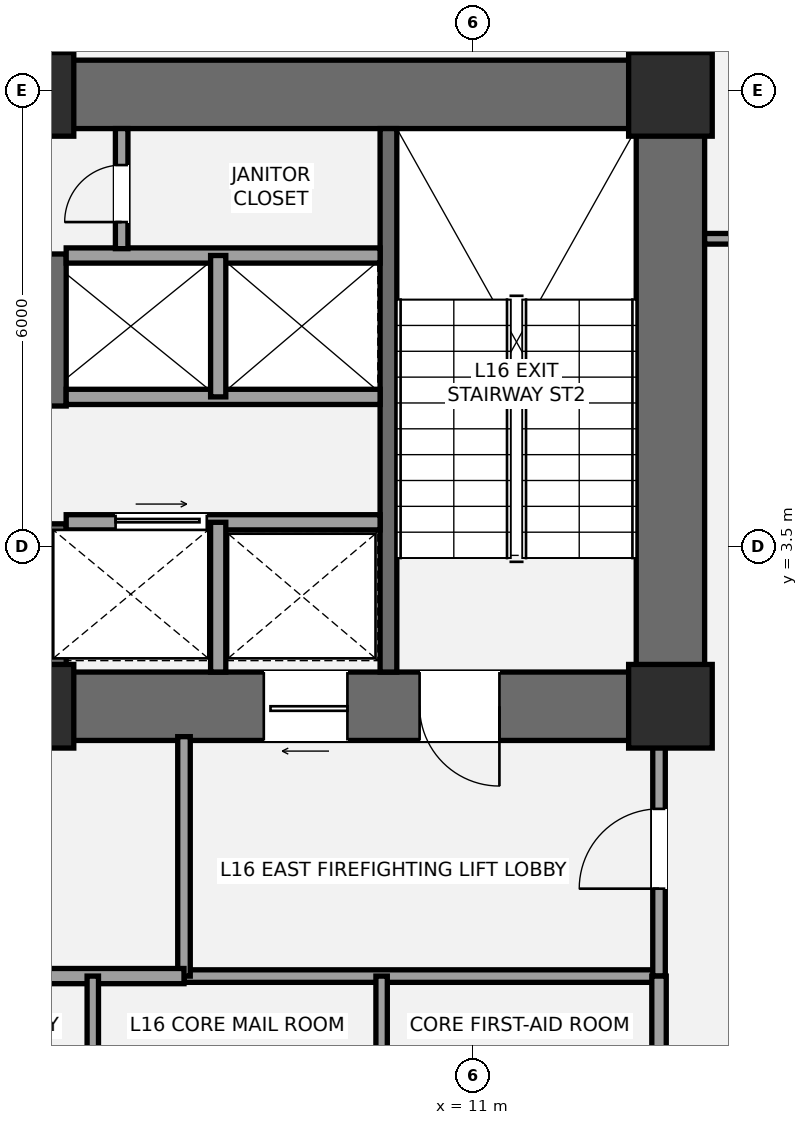
"""IFC4 building model, lengths in metres.
Left out: names, types, materials, properties, quantities, classifications, styles, units other than length and angle.
Written with IfcOpenShell. Run it as: python <this file> out.ifc"""

import sys

from ifc_helpers import new_model, si_unit, direction, frame, frame_2d, origin, origin_2d, place, context, subcontext, project, spatial, rectangle, extrude, element, fill, save


model = new_model("IFC4")
c1 = context("Model", 3, precision=1e-05, world=origin(), true_north=direction((0.0, 1.0)))
c2 = subcontext(c1, "Body", "Model", "MODEL_VIEW")
j1 = project(units=[si_unit("LENGTHUNIT", "METRE"), si_unit("PLANEANGLEUNIT", "RADIAN")], contexts=[c1])
p1 = place(None, origin())
s1 = spatial("IfcSite", under=j1, at=p1, CompositionType="ELEMENT")
p2 = place(p1, origin())
s2 = spatial("IfcBuilding", under=s1, at=p2, CompositionType="ELEMENT")
p3 = place(p2, frame((0.0, 0.0, 63.0)))
s3 = spatial("IfcBuildingStorey", under=s2, at=p3, CompositionType="ELEMENT", Elevation=63.0)
p4 = place(p3, frame((13.6, 0.95, 0.0), z_axis=(0.0, 0.0, 1.0), x_axis=(0.0, 1.0, 0.0)))
e1 = element("IfcWall", 1, at=p4, inside=s3, PredefinedType="SHEAR", context=c2, shape_type="SweptSolid", body=[
    extrude(rectangle(XDim=8.95, YDim=0.9, at=frame_2d((4.475, 0.0))), origin(), (0.0, 0.0, 1.0), 3.6),
])
p5 = place(p3, frame((4.35, 9.45, 0.0), z_axis=(0.0, 0.0, 1.0), x_axis=(1.0, 0.0, 0.0)))
e2 = element("IfcWall", 2, at=p5, inside=s3, PredefinedType="SHEAR", context=c2, shape_type="SweptSolid", body=[
    extrude(rectangle(XDim=9.7, YDim=0.9, at=frame_2d((4.85, 0.0))), origin(), (0.0, 0.0, 1.0), 3.6),
])
p6 = place(p3, frame((14.05, 1.4, 0.0), z_axis=(0.0, 0.0, 1.0), x_axis=(-1.0, 0.0, 0.0)))
e3 = element("IfcWall", 3, at=p6, inside=s3, PredefinedType="SHEAR", context=c2, shape_type="SweptSolid", body=[
    extrude(rectangle(XDim=9.3, YDim=0.9, at=frame_2d((4.65, 0.0))), origin(), (0.0, 0.0, 1.0), 3.6),
])
p7 = place(p6, frame((2.7, 0.0, 0.0)))
e4 = element("IfcOpeningElement", 4, at=p7, cuts=e3, PredefinedType="OPENING", context=c2, shape_type="SweptSolid", body=[
    extrude(rectangle(XDim=1.05, YDim=2.15, at=frame_2d((0.525, 1.075))), frame((0.0, 0.46, 0.0), z_axis=(0.0, -1.0, 0.0), x_axis=(1.0, 0.0, 0.0)), (0.0, 0.0, 1.0), 0.92),
])
p8 = place(p6, frame((4.7, 0.0, 0.0)))
e5 = element("IfcOpeningElement", 5, at=p8, cuts=e3, PredefinedType="OPENING", context=c2, shape_type="SweptSolid", body=[
    extrude(rectangle(XDim=1.1, YDim=2.2, at=frame_2d((0.55, 1.1))), frame((0.0, 0.46, 0.0), z_axis=(0.0, -1.0, 0.0), x_axis=(1.0, 0.0, 0.0)), (0.0, 0.0, 1.0), 0.92),
])
p9 = place(p3, frame((5.2, 0.95, 0.0), z_axis=(0.0, 0.0, 1.0), x_axis=(0.0, 1.0, 0.0)))
e6 = element("IfcWall", 6, at=p9, inside=s3, PredefinedType="SHEAR", context=c2, shape_type="SweptSolid", body=[
    extrude(rectangle(XDim=2.85, YDim=0.9, at=frame_2d((1.425, 0.0))), origin(), (0.0, 0.0, 1.0), 3.6),
])
p10 = place(p3, frame((5.2, 5.35, 0.0), z_axis=(0.0, 0.0, 1.0), x_axis=(0.0, 1.0, 0.0)))
e7 = element("IfcWall", 7, at=p10, inside=s3, PredefinedType="SHEAR", context=c2, shape_type="SweptSolid", body=[
    extrude(rectangle(XDim=2.0, YDim=0.9, at=frame_2d((1.0, 0.0))), origin(), (0.0, 0.0, 1.0), 3.6),
])
p11 = place(p3, frame((9.89, 1.85, 0.0), z_axis=(0.0, 0.0, 1.0), x_axis=(0.0, 1.0, 0.0)))
e8 = element("IfcWall", 8, at=p11, inside=s3, PredefinedType="SHEAR", context=c2, shape_type="SweptSolid", body=[
    extrude(rectangle(XDim=7.15, YDim=0.22, at=frame_2d((3.575, 0.0))), origin(), (0.0, 0.0, 1.0), 3.6),
])
for number, where, z_axis, x_axis in (
    (9, (5.2, 1.4, 0.0), (0.0, 0.0, 1.0), (1.0, 0.0, 0.0)),
    (10, (5.2, 9.45, 0.0), (0.0, 0.0, 1.0), (1.0, 0.0, 0.0)),
    (11, (13.6, 1.4, 0.0), (0.0, 0.0, 1.0), (1.0, 0.0, 0.0)),
    (12, (13.6, 9.45, 0.0), (0.0, 0.0, 1.0), (1.0, 0.0, 0.0)),
):
    element("IfcColumn", number, at=place(p3, frame(where, z_axis=z_axis, x_axis=x_axis)), inside=s3, PredefinedType="COLUMN", context=c2, shape_type="SweptSolid", body=[
        extrude(rectangle(XDim=1.1, YDim=1.1, at=origin_2d()), origin(), (0.0, 0.0, 1.0), 3.6),
    ])
p12 = place(p3, frame((7.2, -2.15, 0.0), z_axis=(0.0, 0.0, 1.0), x_axis=(1.0, 0.0, 0.0)))
e13 = element("IfcWall", 13, at=p12, inside=s3, PredefinedType="PARTITIONING", context=c2, shape_type="SweptSolid", body=[
    extrude(rectangle(XDim=6.25, YDim=0.165, at=frame_2d((3.125, 0.0))), origin(), (0.0, 0.0, 1.0), 3.4),
])
p13 = place(p3, frame((7.2, -2.15, 0.0), z_axis=(0.0, 0.0, 1.0), x_axis=(0.0, 1.0, 0.0)))
e14 = element("IfcWall", 14, at=p13, inside=s3, PredefinedType="PARTITIONING", context=c2, shape_type="SweptSolid", body=[
    extrude(rectangle(XDim=3.15, YDim=0.165, at=frame_2d((1.575, 0.0))), origin(), (0.0, 0.0, 1.0), 2.853),
])
p14 = place(p3, frame((13.45, -2.15, 0.0), z_axis=(0.0, 0.0, 1.0), x_axis=(0.0, 1.0, 0.0)))
e15 = element("IfcWall", 15, at=p14, inside=s3, PredefinedType="PARTITIONING", context=c2, shape_type="SweptSolid", body=[
    extrude(rectangle(XDim=3.15, YDim=0.165, at=frame_2d((1.575, 0.0))), origin(), (0.0, 0.0, 1.0), 2.853),
])
p15 = place(p14, frame((1.15, 0.0, 0.0)))
e16 = element("IfcOpeningElement", 16, at=p15, cuts=e15, PredefinedType="OPENING", context=c2, shape_type="SweptSolid", body=[
    extrude(rectangle(XDim=1.05, YDim=2.15, at=frame_2d((0.525, 1.075))), frame((0.0, 0.093, 0.0), z_axis=(0.0, -1.0, 0.0), x_axis=(1.0, 0.0, 0.0)), (0.0, 0.0, 1.0), 0.185),
])
p16 = place(p3, frame((4.95, -2.15, 0.0), z_axis=(0.0, 0.0, 1.0), x_axis=(1.0, 0.0, 0.0)))
e17 = element("IfcWall", 17, at=p16, inside=s3, PredefinedType="SOLIDWALL", context=c2, shape_type="SweptSolid", body=[
    extrude(rectangle(XDim=2.25, YDim=0.2, at=frame_2d((1.125, 0.0))), origin(), (0.0, 0.0, 1.0), 3.4),
])
p17 = place(p3, frame((5.65, 3.82, 0.0), z_axis=(0.0, 0.0, 1.0), x_axis=(1.0, 0.0, 0.0)))
e18 = element("IfcWall", 18, at=p17, inside=s3, PredefinedType="SOLIDWALL", context=c2, shape_type="SweptSolid", body=[
    extrude(rectangle(XDim=4.13, YDim=0.2, at=frame_2d((2.065, 0.0))), origin(), (0.0, 0.0, 1.0), 3.4),
])
p18 = place(p17, frame((0.65, 0.0, 0.0)))
e19 = element("IfcOpeningElement", 19, at=p18, cuts=e18, PredefinedType="OPENING", context=c2, shape_type="SweptSolid", body=[
    extrude(rectangle(XDim=1.2, YDim=2.2, at=frame_2d((0.6, 1.1))), frame((0.0, 0.11, 0.0), z_axis=(0.0, -1.0, 0.0), x_axis=(1.0, 0.0, 0.0)), (0.0, 0.0, 1.0), 0.22),
])
p19 = place(p3, frame((7.65, 1.85, 0.0), z_axis=(0.0, 0.0, 1.0), x_axis=(0.0, 1.0, 0.0)))
e20 = element("IfcWall", 20, at=p19, inside=s3, PredefinedType="SOLIDWALL", context=c2, shape_type="SweptSolid", body=[
    extrude(rectangle(XDim=1.97, YDim=0.2, at=frame_2d((0.985, 0.0))), origin(), (0.0, 0.0, 1.0), 3.4),
])
for number, where, z_axis, x_axis in (
    (21, (5.65, 5.47, 0.0), (0.0, 0.0, 1.0), (1.0, 0.0, 0.0)),
    (22, (5.65, 7.33, 0.0), (0.0, 0.0, 1.0), (1.0, 0.0, 0.0)),
):
    element("IfcWall", number, at=place(p3, frame(where, z_axis=z_axis, x_axis=x_axis)), inside=s3, PredefinedType="SOLIDWALL", context=c2, shape_type="SweptSolid", body=[
        extrude(rectangle(XDim=4.13, YDim=0.2, at=frame_2d((2.065, 0.0))), origin(), (0.0, 0.0, 1.0), 3.4),
    ])
p20 = place(p3, frame((7.65, 5.47, 0.0), z_axis=(0.0, 0.0, 1.0), x_axis=(0.0, 1.0, 0.0)))
e23 = element("IfcWall", 23, at=p20, inside=s3, PredefinedType="SOLIDWALL", context=c2, shape_type="SweptSolid", body=[
    extrude(rectangle(XDim=1.86, YDim=0.2, at=frame_2d((0.93, 0.0))), origin(), (0.0, 0.0, 1.0), 3.4),
])
p21 = place(p3, frame((6.38, 7.42, 0.0), z_axis=(0.0, 0.0, 1.0), x_axis=(0.0, 1.0, 0.0)))
e24 = element("IfcWall", 24, at=p21, inside=s3, PredefinedType="PARTITIONING", context=c2, shape_type="SweptSolid", body=[
    extrude(rectangle(XDim=1.58, YDim=0.165, at=frame_2d((0.79, 0.0))), origin(), (0.0, 0.0, 1.0), 3.4),
])
p22 = place(p21, frame((0.35, 0.0, 0.0)))
e25 = element("IfcOpeningElement", 25, at=p22, cuts=e24, PredefinedType="OPENING", context=c2, shape_type="SweptSolid", body=[
    extrude(rectangle(XDim=0.75, YDim=2.1, at=frame_2d((0.375, 1.05))), frame((0.0, 0.093, 0.0), z_axis=(0.0, -1.0, 0.0), x_axis=(1.0, 0.0, 0.0)), (0.0, 0.0, 1.0), 0.185),
])
p23 = place(p3, frame((13.45, -4.05, 0.0), z_axis=(0.0, 0.0, 1.0), x_axis=(0.0, 1.0, 0.0)))
e26 = element("IfcWall", 26, at=p23, inside=s3, PredefinedType="PLUMBINGWALL", context=c2, shape_type="SweptSolid", body=[
    extrude(rectangle(XDim=1.9, YDim=0.19, at=frame_2d((0.95, 0.0))), origin(), (0.0, 0.0, 1.0), 2.853),
])
p24 = place(p3, frame((6.0, -4.05, 0.0), z_axis=(0.0, 0.0, 1.0), x_axis=(0.0, 1.0, 0.0)))
e27 = element("IfcWall", 27, at=p24, inside=s3, PredefinedType="PLUMBINGWALL", context=c2, shape_type="SweptSolid", body=[
    extrude(rectangle(XDim=1.9, YDim=0.15, at=frame_2d((0.95, 0.0))), origin(), (0.0, 0.0, 1.0), 2.841),
])
p25 = place(p3, frame((9.8, -4.05, 0.0), z_axis=(0.0, 0.0, 1.0), x_axis=(0.0, 1.0, 0.0)))
e28 = element("IfcWall", 28, at=p25, inside=s3, PredefinedType="PLUMBINGWALL", context=c2, shape_type="SweptSolid", body=[
    extrude(rectangle(XDim=1.9, YDim=0.15, at=frame_2d((0.95, 0.0))), origin(), (0.0, 0.0, 1.0), 3.4),
])
p26 = place(p3, frame((14.05, 7.55, 0.0), z_axis=(0.0, 0.0, 1.0), x_axis=(1.0, 0.0, 0.0)))
e29 = element("IfcWall", 29, at=p26, inside=s3, PredefinedType="PARTITIONING", context=c2, shape_type="SweptSolid", body=[
    extrude(rectangle(XDim=12.002, YDim=0.14, at=frame_2d((6.001, 0.0))), origin(), (0.0, 0.0, 1.0), 3.4),
])
p27 = place(p26, frame((1.2, 0.0, 0.0)))
e30 = element("IfcOpeningElement", 30, at=p27, cuts=e29, PredefinedType="OPENING", context=c2, shape_type="SweptSolid", body=[
    extrude(rectangle(XDim=0.92, YDim=2.15, at=frame_2d((0.46, 1.075))), frame((0.0, 0.08, 0.0), z_axis=(0.0, -1.0, 0.0), x_axis=(1.0, 0.0, 0.0)), (0.0, 0.0, 1.0), 0.16),
])
p28 = place(p7, origin())
e31 = element("IfcDoor", 31, at=p28, inside=s3, OperationType="SINGLE_SWING_LEFT", PredefinedType="DOOR", context=c2, shape_type="SweptSolid", body=[
    extrude(rectangle(XDim=1.05, YDim=2.15, at=frame_2d((0.525, 1.075))), frame((0.0, 0.025, 0.0), z_axis=(0.0, -1.0, 0.0), x_axis=(1.0, 0.0, 0.0)), (0.0, 0.0, 1.0), 0.05),
])
fill(e4, e31)
p29 = place(p15, origin())
e32 = element("IfcDoor", 32, at=p29, inside=s3, OperationType="SINGLE_SWING_LEFT", PredefinedType="DOOR", context=c2, shape_type="SweptSolid", body=[
    extrude(rectangle(XDim=1.05, YDim=2.15, at=frame_2d((0.525, 1.075))), frame((0.0, 0.025, 0.0), z_axis=(0.0, -1.0, 0.0), x_axis=(1.0, 0.0, 0.0)), (0.0, 0.0, 1.0), 0.05),
])
fill(e16, e32)
p30 = place(p8, origin())
e33 = element("IfcDoor", 33, at=p30, inside=s3, OperationType="SLIDING_TO_LEFT", PredefinedType="DOOR", context=c2, shape_type="SweptSolid", body=[
    extrude(rectangle(XDim=1.1, YDim=2.2, at=frame_2d((0.55, 1.1))), frame((0.0, 0.025, 0.0), z_axis=(0.0, -1.0, 0.0), x_axis=(1.0, 0.0, 0.0)), (0.0, 0.0, 1.0), 0.05),
])
fill(e5, e33)
p31 = place(p18, origin())
e34 = element("IfcDoor", 34, at=p31, inside=s3, OperationType="SLIDING_TO_RIGHT", PredefinedType="DOOR", context=c2, shape_type="SweptSolid", body=[
    extrude(rectangle(XDim=1.2, YDim=2.2, at=frame_2d((0.6, 1.1))), frame((0.0, 0.025, 0.0), z_axis=(0.0, -1.0, 0.0), x_axis=(1.0, 0.0, 0.0)), (0.0, 0.0, 1.0), 0.05),
])
fill(e19, e34)
p32 = place(p22, origin())
e35 = element("IfcDoor", 35, at=p32, inside=s3, OperationType="SINGLE_SWING_LEFT", PredefinedType="DOOR", context=c2, shape_type="SweptSolid", body=[
    extrude(rectangle(XDim=0.75, YDim=2.1, at=frame_2d((0.375, 1.05))), frame((0.0, 0.025, 0.0), z_axis=(0.0, -1.0, 0.0), x_axis=(1.0, 0.0, 0.0)), (0.0, 0.0, 1.0), 0.05),
])
fill(e25, e35)
save(model, sys.argv[1])
